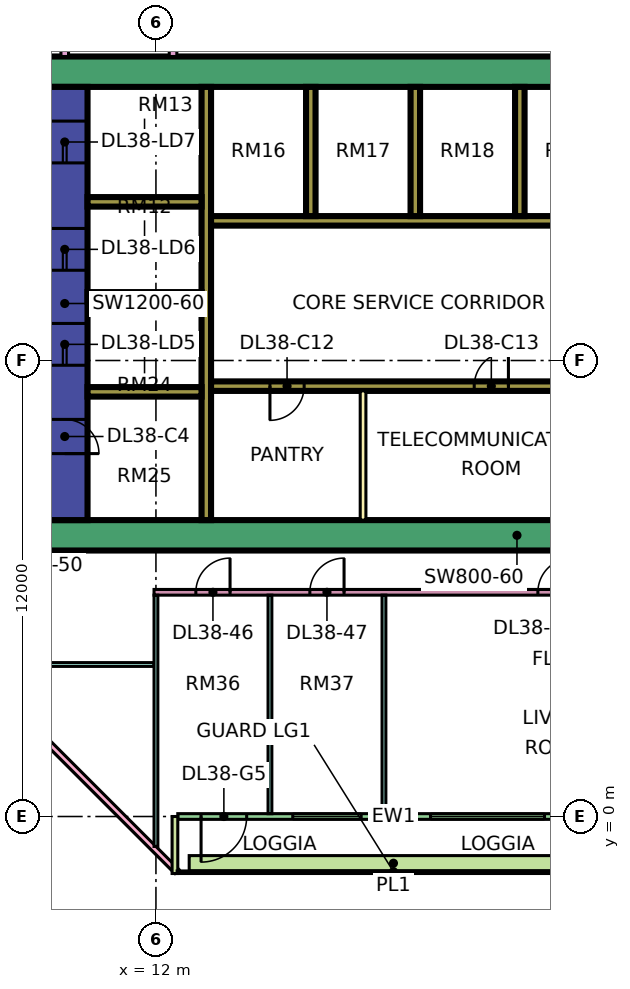
"""IFC4 building model, lengths in metres.
Left out: names, types, materials, properties, quantities, classifications, styles, units other than length and angle.
Written with IfcOpenShell. Run it as: python <this file> out.ifc"""

import sys

from ifc_helpers import new_model, si_unit, direction, frame, frame_2d, origin, place, context, subcontext, project, spatial, rectangle, extrude, element, fill, save


model = new_model("IFC4")
c1 = context("Model", 3, precision=1e-05, world=origin(), true_north=direction((0.0, 1.0)))
c2 = subcontext(c1, "Body", "Model", "MODEL_VIEW")
j1 = project(units=[si_unit("LENGTHUNIT", "METRE"), si_unit("PLANEANGLEUNIT", "RADIAN")], contexts=[c1])
p1 = place(None, origin())
s1 = spatial("IfcSite", under=j1, at=p1, CompositionType="ELEMENT")
p2 = place(p1, origin())
s2 = spatial("IfcBuilding", under=s1, at=p2, CompositionType="ELEMENT")
p3 = place(p2, frame((0.0, 0.0, 168.65)))
s3 = spatial("IfcBuildingStorey", under=s2, at=p3, CompositionType="ELEMENT", Elevation=168.65)
p4 = place(p3, frame((9.0, 7.4, 0.0), z_axis=(0.0, 0.0, 1.0), x_axis=(1.0, 0.0, 0.0)))
e1 = element("IfcWall", 1, at=p4, inside=s3, PredefinedType="SHEAR", context=c2, shape_type="SweptSolid", body=[
    extrude(rectangle(XDim=25.0, YDim=0.8, at=frame_2d((12.5, 0.0))), origin(), (0.0, 0.0, 1.0), 3.75),
])
p5 = place(p3, frame((9.0, 19.6, 0.0), z_axis=(0.0, 0.0, 1.0), x_axis=(1.0, 0.0, 0.0)))
e2 = element("IfcWall", 2, at=p5, inside=s3, PredefinedType="SHEAR", context=c2, shape_type="SweptSolid", body=[
    extrude(rectangle(XDim=25.0, YDim=0.8, at=frame_2d((12.5, 0.0))), origin(), (0.0, 0.0, 1.0), 3.75),
])
p6 = place(p5, frame((19.1, 0.0, 0.0)))
e3 = element("IfcOpeningElement", 3, at=p6, cuts=e2, PredefinedType="OPENING", context=c2, shape_type="SweptSolid", body=[
    extrude(rectangle(XDim=1.8, YDim=2.4, at=frame_2d((0.9, 1.2))), frame((0.0, 0.41, 0.0), z_axis=(0.0, -1.0, 0.0), x_axis=(1.0, 0.0, 0.0)), (0.0, 0.0, 1.0), 0.82),
])
p7 = place(p3, frame((9.6, 7.8, 0.0), z_axis=(0.0, 0.0, 1.0), x_axis=(0.0, 1.0, 0.0)))
e4 = element("IfcWall", 4, at=p7, inside=s3, PredefinedType="SHEAR", context=c2, shape_type="SweptSolid", body=[
    extrude(rectangle(XDim=11.4, YDim=1.2, at=frame_2d((5.7, 0.0))), origin(), (0.0, 0.0, 1.0), 3.75),
])
p8 = place(p7, frame((4.075, 0.0, 0.0)))
e5 = element("IfcOpeningElement", 5, at=p8, cuts=e4, PredefinedType="OPENING", context=c2, shape_type="SweptSolid", body=[
    extrude(rectangle(XDim=1.1, YDim=2.2, at=frame_2d((0.55, 1.1))), frame((0.0, 0.61, 0.0), z_axis=(0.0, -1.0, 0.0), x_axis=(1.0, 0.0, 0.0)), (0.0, 0.0, 1.0), 1.22),
])
p9 = place(p7, frame((6.575, 0.0, 0.0)))
e6 = element("IfcOpeningElement", 6, at=p9, cuts=e4, PredefinedType="OPENING", context=c2, shape_type="SweptSolid", body=[
    extrude(rectangle(XDim=1.1, YDim=2.2, at=frame_2d((0.55, 1.1))), frame((0.0, 0.61, 0.0), z_axis=(0.0, -1.0, 0.0), x_axis=(1.0, 0.0, 0.0)), (0.0, 0.0, 1.0), 1.22),
])
p10 = place(p7, frame((9.4, 0.0, 0.0)))
e7 = element("IfcOpeningElement", 7, at=p10, cuts=e4, PredefinedType="OPENING", context=c2, shape_type="SweptSolid", body=[
    extrude(rectangle(XDim=1.1, YDim=2.2, at=frame_2d((0.55, 1.1))), frame((0.0, 0.61, 0.0), z_axis=(0.0, -1.0, 0.0), x_axis=(1.0, 0.0, 0.0)), (0.0, 0.0, 1.0), 1.22),
])
p11 = place(p7, frame((1.75, 0.0, 0.0)))
e8 = element("IfcOpeningElement", 8, at=p11, cuts=e4, PredefinedType="OPENING", context=c2, shape_type="SweptSolid", body=[
    extrude(rectangle(XDim=0.9, YDim=2.1, at=frame_2d((0.45, 1.05))), frame((0.0, 0.61, 0.0), z_axis=(0.0, -1.0, 0.0), x_axis=(1.0, 0.0, 0.0)), (0.0, 0.0, 1.0), 1.22),
])
p12 = place(p3, frame((13.325, 7.8, 0.0), z_axis=(0.0, 0.0, 1.0), x_axis=(0.0, 1.0, 0.0)))
e9 = element("IfcWall", 9, at=p12, inside=s3, PredefinedType="SHEAR", context=c2, shape_type="SweptSolid", body=[
    extrude(rectangle(XDim=11.4, YDim=0.25, at=frame_2d((5.7, 0.0))), origin(), (0.0, 0.0, 1.0), 3.75),
])
p13 = place(p3, frame((13.45, 11.325, 0.0), z_axis=(0.0, 0.0, 1.0), x_axis=(1.0, 0.0, 0.0)))
e10 = element("IfcWall", 10, at=p13, inside=s3, PredefinedType="SHEAR", context=c2, shape_type="SweptSolid", body=[
    extrude(rectangle(XDim=19.75, YDim=0.25, at=frame_2d((9.875, 0.0))), origin(), (0.0, 0.0, 1.0), 3.75),
])
p14 = place(p13, frame((11.65, 0.0, 0.0)))
e11 = element("IfcOpeningElement", 11, at=p14, cuts=e10, PredefinedType="OPENING", context=c2, shape_type="SweptSolid", body=[
    extrude(rectangle(XDim=1.2, YDim=2.2, at=frame_2d((0.6, 1.1))), frame((0.0, 0.135, 0.0), z_axis=(0.0, -1.0, 0.0), x_axis=(1.0, 0.0, 0.0)), (0.0, 0.0, 1.0), 0.27),
])
p15 = place(p13, frame((14.4, 0.0, 0.0)))
e12 = element("IfcOpeningElement", 12, at=p15, cuts=e10, PredefinedType="OPENING", context=c2, shape_type="SweptSolid", body=[
    extrude(rectangle(XDim=1.2, YDim=2.2, at=frame_2d((0.6, 1.1))), frame((0.0, 0.135, 0.0), z_axis=(0.0, -1.0, 0.0), x_axis=(1.0, 0.0, 0.0)), (0.0, 0.0, 1.0), 0.27),
])
p16 = place(p13, frame((17.15, 0.0, 0.0)))
e13 = element("IfcOpeningElement", 13, at=p16, cuts=e10, PredefinedType="OPENING", context=c2, shape_type="SweptSolid", body=[
    extrude(rectangle(XDim=1.2, YDim=2.2, at=frame_2d((0.6, 1.1))), frame((0.0, 0.135, 0.0), z_axis=(0.0, -1.0, 0.0), x_axis=(1.0, 0.0, 0.0)), (0.0, 0.0, 1.0), 0.27),
])
p17 = place(p13, frame((1.55, 0.0, 0.0)))
e14 = element("IfcOpeningElement", 14, at=p17, cuts=e10, PredefinedType="OPENING", context=c2, shape_type="SweptSolid", body=[
    extrude(rectangle(XDim=0.9, YDim=2.1, at=frame_2d((0.45, 1.05))), frame((0.0, 0.135, 0.0), z_axis=(0.0, -1.0, 0.0), x_axis=(1.0, 0.0, 0.0)), (0.0, 0.0, 1.0), 0.27),
])
p18 = place(p13, frame((6.925, 0.0, 0.0)))
e15 = element("IfcOpeningElement", 15, at=p18, cuts=e10, PredefinedType="OPENING", context=c2, shape_type="SweptSolid", body=[
    extrude(rectangle(XDim=0.9, YDim=2.1, at=frame_2d((0.45, 1.05))), frame((0.0, 0.135, 0.0), z_axis=(0.0, -1.0, 0.0), x_axis=(1.0, 0.0, 0.0)), (0.0, 0.0, 1.0), 0.27),
])
p19 = place(p3, frame((13.45, 15.675, 0.0), z_axis=(0.0, 0.0, 1.0), x_axis=(1.0, 0.0, 0.0)))
e16 = element("IfcWall", 16, at=p19, inside=s3, PredefinedType="SHEAR", context=c2, shape_type="SweptSolid", body=[
    extrude(rectangle(XDim=13.75, YDim=0.25, at=frame_2d((6.875, 0.0))), origin(), (0.0, 0.0, 1.0), 3.75),
])
p20 = place(p19, frame((11.65, 0.0, 0.0)))
e17 = element("IfcOpeningElement", 17, at=p20, cuts=e16, PredefinedType="OPENING", context=c2, shape_type="SweptSolid", body=[
    extrude(rectangle(XDim=1.2, YDim=2.2, at=frame_2d((0.6, 1.1))), frame((0.0, 0.135, 0.0), z_axis=(0.0, -1.0, 0.0), x_axis=(1.0, 0.0, 0.0)), (0.0, 0.0, 1.0), 0.27),
])
for number, where, z_axis, x_axis in (
    (18, (10.2, 11.175, 0.0), (0.0, 0.0, 1.0), (1.0, 0.0, 0.0)),
    (19, (10.2, 13.675, 0.0), (0.0, 0.0, 1.0), (1.0, 0.0, 0.0)),
    (20, (10.2, 16.175, 0.0), (0.0, 0.0, 1.0), (1.0, 0.0, 0.0)),
):
    element("IfcWall", number, at=place(p3, frame(where, z_axis=z_axis, x_axis=x_axis)), inside=s3, PredefinedType="SHEAR", context=c2, shape_type="SweptSolid", body=[
        extrude(rectangle(XDim=3.0, YDim=0.25, at=frame_2d((1.5, 0.0))), origin(), (0.0, 0.0, 1.0), 3.75),
    ])
for number, where, z_axis, x_axis in (
    (21, (16.075, 15.8, 0.0), (0.0, 0.0, 1.0), (0.0, 1.0, 0.0)),
    (22, (18.825, 15.8, 0.0), (0.0, 0.0, 1.0), (0.0, 1.0, 0.0)),
    (23, (21.575, 15.8, 0.0), (0.0, 0.0, 1.0), (0.0, 1.0, 0.0)),
):
    element("IfcWall", number, at=place(p3, frame(where, z_axis=z_axis, x_axis=x_axis)), inside=s3, PredefinedType="SHEAR", context=c2, shape_type="SweptSolid", body=[
        extrude(rectangle(XDim=3.4, YDim=0.25, at=frame_2d((1.7, 0.0))), origin(), (0.0, 0.0, 1.0), 3.75),
    ])
p21 = place(p3, frame((-1.447, 12.553, 0.0), z_axis=(0.0, 0.0, 1.0), x_axis=(0.707106781187, -0.707106781187, 0.0)))
e24 = element("IfcWall", 24, at=p21, inside=s3, PredefinedType="SOLIDWALL", context=c2, shape_type="SweptSolid", body=[
    extrude(rectangle(XDim=19.799, YDim=0.15, at=frame_2d((9.899, 0.0))), origin(), (0.0, 0.0, 1.0), 3.35),
])
p22 = place(p21, frame((2.212, 0.0, 0.45)))
e25 = element("IfcOpeningElement", 25, at=p22, cuts=e24, PredefinedType="OPENING", context=c2, shape_type="SweptSolid", body=[
    extrude(rectangle(XDim=3.0, YDim=2.4, at=frame_2d((1.5, 1.2))), frame((0.0, 0.085, 0.0), z_axis=(0.0, -1.0, 0.0), x_axis=(1.0, 0.0, 0.0)), (0.0, 0.0, 1.0), 0.17),
])
p23 = place(p21, frame((10.216, 0.0, 0.45)))
e26 = element("IfcOpeningElement", 26, at=p23, cuts=e24, PredefinedType="OPENING", context=c2, shape_type="SweptSolid", body=[
    extrude(rectangle(XDim=3.0, YDim=2.4, at=frame_2d((1.5, 1.2))), frame((0.0, 0.085, 0.0), z_axis=(0.0, -1.0, 0.0), x_axis=(1.0, 0.0, 0.0)), (0.0, 0.0, 1.0), 0.17),
])
p24 = place(p3, frame((12.575, 0.0, 0.0), z_axis=(0.0, 0.0, 1.0), x_axis=(1.0, 0.0, 0.0)))
e27 = element("IfcWall", 27, at=p24, inside=s3, PredefinedType="SOLIDWALL", context=c2, shape_type="SweptSolid", body=[
    extrude(rectangle(XDim=11.35, YDim=0.15, at=frame_2d((5.675, 0.0))), origin(), (0.0, 0.0, 1.0), 3.35),
])
p25 = place(p24, frame((0.613, 0.0, 0.0)))
e28 = element("IfcOpeningElement", 28, at=p25, cuts=e27, PredefinedType="OPENING", context=c2, shape_type="SweptSolid", body=[
    extrude(rectangle(XDim=1.2, YDim=2.4, at=frame_2d((0.6, 1.2))), frame((0.0, 0.085, 0.0), z_axis=(0.0, -1.0, 0.0), x_axis=(1.0, 0.0, 0.0)), (0.0, 0.0, 1.0), 0.17),
])
p26 = place(p24, frame((3.025, 0.0, 0.45)))
e29 = element("IfcOpeningElement", 29, at=p26, cuts=e27, PredefinedType="OPENING", context=c2, shape_type="SweptSolid", body=[
    extrude(rectangle(XDim=1.8, YDim=2.4, at=frame_2d((0.9, 1.2))), frame((0.0, 0.085, 0.0), z_axis=(0.0, -1.0, 0.0), x_axis=(1.0, 0.0, 0.0)), (0.0, 0.0, 1.0), 0.17),
])
p27 = place(p24, frame((6.65, 0.0, 0.45)))
e30 = element("IfcOpeningElement", 30, at=p27, cuts=e27, PredefinedType="OPENING", context=c2, shape_type="SweptSolid", body=[
    extrude(rectangle(XDim=3.0, YDim=2.4, at=frame_2d((1.5, 1.2))), frame((0.0, 0.085, 0.0), z_axis=(0.0, -1.0, 0.0), x_axis=(1.0, 0.0, 0.0)), (0.0, 0.0, 1.0), 0.17),
])
p28 = place(p3, frame((12.5, -1.5, 0.0), z_axis=(0.0, 0.0, 1.0), x_axis=(0.0, 1.0, 0.0)))
e31 = element("IfcWall", 31, at=p28, inside=s3, PredefinedType="SOLIDWALL", context=c2, shape_type="SweptSolid", body=[
    extrude(rectangle(XDim=1.5, YDim=0.15, at=frame_2d((0.75, 0.0))), origin(), (0.0, 0.0, 1.0), 3.35),
])
p29 = place(p3, frame((12.875, -1.229, 0.0), z_axis=(0.0, 0.0, 1.0), x_axis=(1.0, 0.0, 0.0)))
e32 = element("IfcWall", 32, at=p29, inside=s3, PredefinedType="SOLIDWALL", context=c2, shape_type="SweptSolid", body=[
    extrude(rectangle(XDim=10.75, YDim=0.4, at=frame_2d((5.375, 0.0))), origin(), (0.0, 0.0, 1.0), 0.7),
])
p30 = place(p3, frame((17.45, 7.8, 0.0), z_axis=(0.0, 0.0, 1.0), x_axis=(0.0, 1.0, 0.0)))
e33 = element("IfcWall", 33, at=p30, inside=s3, PredefinedType="PARTITIONING", context=c2, shape_type="SweptSolid", body=[
    extrude(rectangle(XDim=3.4, YDim=0.15, at=frame_2d((1.7, 0.0))), origin(), (0.0, 0.0, 1.0), 3.35),
])
p31 = place(p3, frame((9.05, 4.0, 0.0), z_axis=(0.0, 0.0, 1.0), x_axis=(1.0, 0.0, 0.0)))
e34 = element("IfcWall", 34, at=p31, inside=s3, PredefinedType="PARTITIONING", context=c2, shape_type="SweptSolid", body=[
    extrude(rectangle(XDim=2.9, YDim=0.1, at=frame_2d((1.45, 0.0))), origin(), (0.0, 0.0, 1.0), 3.35),
])
p32 = place(p3, frame((9.6, 20.0, 0.0), z_axis=(0.0, 0.0, 1.0), x_axis=(0.0, 1.0, 0.0)))
e35 = element("IfcWall", 35, at=p32, inside=s3, PredefinedType="PARTITIONING", context=c2, shape_type="SweptSolid", body=[
    extrude(rectangle(XDim=44.35, YDim=0.2, at=frame_2d((22.175, 0.0))), origin(), (0.0, 0.0, 1.0), 3.35),
])
p33 = place(p32, frame((28.8, 0.0, 0.0)))
e36 = element("IfcOpeningElement", 36, at=p33, cuts=e35, PredefinedType="OPENING", context=c2, shape_type="SweptSolid", body=[
    extrude(rectangle(XDim=1.0, YDim=2.1, at=frame_2d((0.5, 1.05))), frame((0.0, 0.11, 0.0), z_axis=(0.0, -1.0, 0.0), x_axis=(1.0, 0.0, 0.0)), (0.0, 0.0, 1.0), 0.22),
])
p34 = place(p32, frame((32.1, 0.0, 0.0)))
e37 = element("IfcOpeningElement", 37, at=p34, cuts=e35, PredefinedType="OPENING", context=c2, shape_type="SweptSolid", body=[
    extrude(rectangle(XDim=1.0, YDim=2.1, at=frame_2d((0.5, 1.05))), frame((0.0, 0.11, 0.0), z_axis=(0.0, -1.0, 0.0), x_axis=(1.0, 0.0, 0.0)), (0.0, 0.0, 1.0), 0.22),
])
p35 = place(p32, frame((0.6, 0.0, 0.0)))
e38 = element("IfcOpeningElement", 38, at=p35, cuts=e35, PredefinedType="OPENING", context=c2, shape_type="SweptSolid", body=[
    extrude(rectangle(XDim=1.2, YDim=2.1, at=frame_2d((0.6, 1.05))), frame((0.0, 0.11, 0.0), z_axis=(0.0, -1.0, 0.0), x_axis=(1.0, 0.0, 0.0)), (0.0, 0.0, 1.0), 0.22),
])
p36 = place(p32, frame((14.25, 0.0, 0.0)))
e39 = element("IfcOpeningElement", 39, at=p36, cuts=e35, PredefinedType="OPENING", context=c2, shape_type="SweptSolid", body=[
    extrude(rectangle(XDim=1.0, YDim=2.1, at=frame_2d((0.5, 1.05))), frame((0.0, 0.11, 0.0), z_axis=(0.0, -1.0, 0.0), x_axis=(1.0, 0.0, 0.0)), (0.0, 0.0, 1.0), 0.22),
])
p37 = place(p3, frame((11.95, 5.9, 0.0), z_axis=(0.0, 0.0, 1.0), x_axis=(1.0, 0.0, 0.0)))
e40 = element("IfcWall", 40, at=p37, inside=s3, PredefinedType="PARTITIONING", context=c2, shape_type="SweptSolid", body=[
    extrude(rectangle(XDim=21.1, YDim=0.15, at=frame_2d((10.55, 0.0))), origin(), (0.0, 0.0, 1.0), 3.35),
])
p38 = place(p37, frame((1.1, 0.0, 0.0)))
e41 = element("IfcOpeningElement", 41, at=p38, cuts=e40, PredefinedType="OPENING", context=c2, shape_type="SweptSolid", body=[
    extrude(rectangle(XDim=0.9, YDim=2.1, at=frame_2d((0.45, 1.05))), frame((0.0, 0.085, 0.0), z_axis=(0.0, -1.0, 0.0), x_axis=(1.0, 0.0, 0.0)), (0.0, 0.0, 1.0), 0.17),
])
p39 = place(p37, frame((4.1, 0.0, 0.0)))
e42 = element("IfcOpeningElement", 42, at=p39, cuts=e40, PredefinedType="OPENING", context=c2, shape_type="SweptSolid", body=[
    extrude(rectangle(XDim=0.9, YDim=2.1, at=frame_2d((0.45, 1.05))), frame((0.0, 0.085, 0.0), z_axis=(0.0, -1.0, 0.0), x_axis=(1.0, 0.0, 0.0)), (0.0, 0.0, 1.0), 0.17),
])
p40 = place(p37, frame((10.1, 0.0, 0.0)))
e43 = element("IfcOpeningElement", 43, at=p40, cuts=e40, PredefinedType="OPENING", context=c2, shape_type="SweptSolid", body=[
    extrude(rectangle(XDim=0.9, YDim=2.1, at=frame_2d((0.45, 1.05))), frame((0.0, 0.085, 0.0), z_axis=(0.0, -1.0, 0.0), x_axis=(1.0, 0.0, 0.0)), (0.0, 0.0, 1.0), 0.17),
])
p41 = place(p3, frame((12.0, -0.788, 0.0), z_axis=(0.0, 0.0, 1.0), x_axis=(0.0, 1.0, 0.0)))
e44 = element("IfcWall", 44, at=p41, inside=s3, PredefinedType="PARTITIONING", context=c2, shape_type="SweptSolid", body=[
    extrude(rectangle(XDim=6.613, YDim=0.1, at=frame_2d((3.306, 0.0))), origin(), (0.0, 0.0, 1.0), 3.35),
])
p42 = place(p3, frame((12.45, 20.0, 0.0), z_axis=(0.0, 0.0, 1.0), x_axis=(0.0, 1.0, 0.0)))
e45 = element("IfcWall", 45, at=p42, inside=s3, PredefinedType="PARTITIONING", context=c2, shape_type="SweptSolid", body=[
    extrude(rectangle(XDim=42.926, YDim=0.2, at=frame_2d((21.463, 0.0))), origin(), (0.0, 0.0, 1.0), 3.35),
])
p43 = place(p42, frame((6.55, 0.0, 0.0)))
e46 = element("IfcOpeningElement", 46, at=p43, cuts=e45, PredefinedType="OPENING", context=c2, shape_type="SweptSolid", body=[
    extrude(rectangle(XDim=1.0, YDim=2.1, at=frame_2d((0.5, 1.05))), frame((0.0, 0.11, 0.0), z_axis=(0.0, -1.0, 0.0), x_axis=(1.0, 0.0, 0.0)), (0.0, 0.0, 1.0), 0.22),
])
p44 = place(p42, frame((12.25, 0.0, 0.0)))
e47 = element("IfcOpeningElement", 47, at=p44, cuts=e45, PredefinedType="OPENING", context=c2, shape_type="SweptSolid", body=[
    extrude(rectangle(XDim=1.6, YDim=2.1, at=frame_2d((0.8, 1.05))), frame((0.0, 0.11, 0.0), z_axis=(0.0, -1.0, 0.0), x_axis=(1.0, 0.0, 0.0)), (0.0, 0.0, 1.0), 0.22),
])
p45 = place(p42, frame((16.9, 0.0, 0.0)))
e48 = element("IfcOpeningElement", 48, at=p45, cuts=e45, PredefinedType="OPENING", context=c2, shape_type="SweptSolid", body=[
    extrude(rectangle(XDim=1.0, YDim=2.1, at=frame_2d((0.5, 1.05))), frame((0.0, 0.11, 0.0), z_axis=(0.0, -1.0, 0.0), x_axis=(1.0, 0.0, 0.0)), (0.0, 0.0, 1.0), 0.22),
])
p46 = place(p42, frame((40.9, 0.0, 0.0)))
e49 = element("IfcOpeningElement", 49, at=p46, cuts=e45, PredefinedType="OPENING", context=c2, shape_type="SweptSolid", body=[
    extrude(rectangle(XDim=1.0, YDim=2.1, at=frame_2d((0.5, 1.05))), frame((0.0, 0.11, 0.0), z_axis=(0.0, -1.0, 0.0), x_axis=(1.0, 0.0, 0.0)), (0.0, 0.0, 1.0), 0.22),
])
p47 = place(p42, frame((1.15, 0.0, 0.0)))
e50 = element("IfcOpeningElement", 50, at=p47, cuts=e45, PredefinedType="OPENING", context=c2, shape_type="SweptSolid", body=[
    extrude(rectangle(XDim=1.8, YDim=2.1, at=frame_2d((0.9, 1.05))), frame((0.0, 0.11, 0.0), z_axis=(0.0, -1.0, 0.0), x_axis=(1.0, 0.0, 0.0)), (0.0, 0.0, 1.0), 0.22),
])
p48 = place(p42, frame((28.6, 0.0, 0.0)))
e51 = element("IfcOpeningElement", 51, at=p48, cuts=e45, PredefinedType="OPENING", context=c2, shape_type="SweptSolid", body=[
    extrude(rectangle(XDim=1.8, YDim=2.1, at=frame_2d((0.9, 1.05))), frame((0.0, 0.11, 0.0), z_axis=(0.0, -1.0, 0.0), x_axis=(1.0, 0.0, 0.0)), (0.0, 0.0, 1.0), 0.22),
])
for number, where, z_axis, x_axis in (
    (52, (15.0, 0.074, 0.0), (0.0, 0.0, 1.0), (0.0, 1.0, 0.0)),
    (53, (18.0, 0.074, 0.0), (0.0, 0.0, 1.0), (0.0, 1.0, 0.0)),
):
    element("IfcWall", number, at=place(p3, frame(where, z_axis=z_axis, x_axis=x_axis)), inside=s3, PredefinedType="PARTITIONING", context=c2, shape_type="SweptSolid", body=[
        extrude(rectangle(XDim=5.751, YDim=0.1, at=frame_2d((2.875, 0.0))), origin(), (0.0, 0.0, 1.0), 3.35),
    ])
p49 = place(p25, frame((1.2, 0.0, 0.0), z_axis=(0.0, 0.0, 1.0), x_axis=(-1.0, 0.0, 0.0)))
e54 = element("IfcDoor", 54, at=p49, inside=s3, OperationType="DOUBLE_DOOR_SINGLE_SWING", PredefinedType="DOOR", context=c2, shape_type="SweptSolid", body=[
    extrude(rectangle(XDim=1.2, YDim=2.4, at=frame_2d((0.6, 1.2))), frame((0.0, 0.025, 0.0), z_axis=(0.0, -1.0, 0.0), x_axis=(1.0, 0.0, 0.0)), (0.0, 0.0, 1.0), 0.05),
])
fill(e28, e54)
p50 = place(p26, origin())
e55 = element("IfcWindow", 55, at=p50, inside=s3, PartitioningType="SINGLE_PANEL", PredefinedType="WINDOW", context=c2, shape_type="SweptSolid", body=[
    extrude(rectangle(XDim=1.8, YDim=2.4, at=frame_2d((0.9, 1.2))), frame((0.0, 0.03, 0.0), z_axis=(0.0, -1.0, 0.0), x_axis=(1.0, 0.0, 0.0)), (0.0, 0.0, 1.0), 0.06),
])
fill(e29, e55)
p51 = place(p27, origin())
e56 = element("IfcWindow", 56, at=p51, inside=s3, PartitioningType="SINGLE_PANEL", PredefinedType="WINDOW", context=c2, shape_type="SweptSolid", body=[
    extrude(rectangle(XDim=3.0, YDim=2.4, at=frame_2d((1.5, 1.2))), frame((0.0, 0.03, 0.0), z_axis=(0.0, -1.0, 0.0), x_axis=(1.0, 0.0, 0.0)), (0.0, 0.0, 1.0), 0.06),
])
fill(e30, e56)
p52 = place(p8, origin())
e57 = element("IfcDoor", 57, at=p52, inside=s3, OperationType="DOUBLE_DOOR_SLIDING", PredefinedType="DOOR", context=c2, shape_type="SweptSolid", body=[
    extrude(rectangle(XDim=1.1, YDim=2.2, at=frame_2d((0.55, 1.1))), frame((0.0, 0.025, 0.0), z_axis=(0.0, -1.0, 0.0), x_axis=(1.0, 0.0, 0.0)), (0.0, 0.0, 1.0), 0.05),
])
fill(e5, e57)
p53 = place(p9, origin())
e58 = element("IfcDoor", 58, at=p53, inside=s3, OperationType="DOUBLE_DOOR_SLIDING", PredefinedType="DOOR", context=c2, shape_type="SweptSolid", body=[
    extrude(rectangle(XDim=1.1, YDim=2.2, at=frame_2d((0.55, 1.1))), frame((0.0, 0.025, 0.0), z_axis=(0.0, -1.0, 0.0), x_axis=(1.0, 0.0, 0.0)), (0.0, 0.0, 1.0), 0.05),
])
fill(e6, e58)
p54 = place(p10, origin())
e59 = element("IfcDoor", 59, at=p54, inside=s3, OperationType="DOUBLE_DOOR_SLIDING", PredefinedType="DOOR", context=c2, shape_type="SweptSolid", body=[
    extrude(rectangle(XDim=1.1, YDim=2.2, at=frame_2d((0.55, 1.1))), frame((0.0, 0.025, 0.0), z_axis=(0.0, -1.0, 0.0), x_axis=(1.0, 0.0, 0.0)), (0.0, 0.0, 1.0), 0.05),
])
fill(e7, e59)
p55 = place(p11, frame((0.9, 0.0, 0.0), z_axis=(0.0, 0.0, 1.0), x_axis=(-1.0, 0.0, 0.0)))
e60 = element("IfcDoor", 60, at=p55, inside=s3, OperationType="SINGLE_SWING_LEFT", PredefinedType="DOOR", context=c2, shape_type="SweptSolid", body=[
    extrude(rectangle(XDim=0.9, YDim=2.1, at=frame_2d((0.45, 1.05))), frame((0.0, 0.025, 0.0), z_axis=(0.0, -1.0, 0.0), x_axis=(1.0, 0.0, 0.0)), (0.0, 0.0, 1.0), 0.05),
])
fill(e8, e60)
p56 = place(p17, frame((0.9, 0.0, 0.0), z_axis=(0.0, 0.0, 1.0), x_axis=(-1.0, 0.0, 0.0)))
e61 = element("IfcDoor", 61, at=p56, inside=s3, OperationType="SINGLE_SWING_LEFT", PredefinedType="DOOR", context=c2, shape_type="SweptSolid", body=[
    extrude(rectangle(XDim=0.9, YDim=2.1, at=frame_2d((0.45, 1.05))), frame((0.0, 0.025, 0.0), z_axis=(0.0, -1.0, 0.0), x_axis=(1.0, 0.0, 0.0)), (0.0, 0.0, 1.0), 0.05),
])
fill(e14, e61)
p57 = place(p18, frame((0.9, 0.0, 0.0), z_axis=(0.0, 0.0, 1.0), x_axis=(-1.0, 0.0, 0.0)))
e62 = element("IfcDoor", 62, at=p57, inside=s3, OperationType="SINGLE_SWING_RIGHT", PredefinedType="DOOR", context=c2, shape_type="SweptSolid", body=[
    extrude(rectangle(XDim=0.9, YDim=2.1, at=frame_2d((0.45, 1.05))), frame((0.0, 0.025, 0.0), z_axis=(0.0, -1.0, 0.0), x_axis=(1.0, 0.0, 0.0)), (0.0, 0.0, 1.0), 0.05),
])
fill(e15, e62)
p58 = place(p38, frame((0.9, 0.0, 0.0), z_axis=(0.0, 0.0, 1.0), x_axis=(-1.0, 0.0, 0.0)))
e63 = element("IfcDoor", 63, at=p58, inside=s3, OperationType="SINGLE_SWING_RIGHT", PredefinedType="DOOR", context=c2, shape_type="SweptSolid", body=[
    extrude(rectangle(XDim=0.9, YDim=2.1, at=frame_2d((0.45, 1.05))), frame((0.0, 0.025, 0.0), z_axis=(0.0, -1.0, 0.0), x_axis=(1.0, 0.0, 0.0)), (0.0, 0.0, 1.0), 0.05),
])
fill(e41, e63)
p59 = place(p39, frame((0.9, 0.0, 0.0), z_axis=(0.0, 0.0, 1.0), x_axis=(-1.0, 0.0, 0.0)))
e64 = element("IfcDoor", 64, at=p59, inside=s3, OperationType="SINGLE_SWING_RIGHT", PredefinedType="DOOR", context=c2, shape_type="SweptSolid", body=[
    extrude(rectangle(XDim=0.9, YDim=2.1, at=frame_2d((0.45, 1.05))), frame((0.0, 0.025, 0.0), z_axis=(0.0, -1.0, 0.0), x_axis=(1.0, 0.0, 0.0)), (0.0, 0.0, 1.0), 0.05),
])
fill(e42, e64)
p60 = place(p40, frame((0.9, 0.0, 0.0), z_axis=(0.0, 0.0, 1.0), x_axis=(-1.0, 0.0, 0.0)))
e65 = element("IfcDoor", 65, at=p60, inside=s3, OperationType="SINGLE_SWING_RIGHT", PredefinedType="DOOR", context=c2, shape_type="SweptSolid", body=[
    extrude(rectangle(XDim=0.9, YDim=2.1, at=frame_2d((0.45, 1.05))), frame((0.0, 0.025, 0.0), z_axis=(0.0, -1.0, 0.0), x_axis=(1.0, 0.0, 0.0)), (0.0, 0.0, 1.0), 0.05),
])
fill(e43, e65)
save(model, sys.argv[1])
